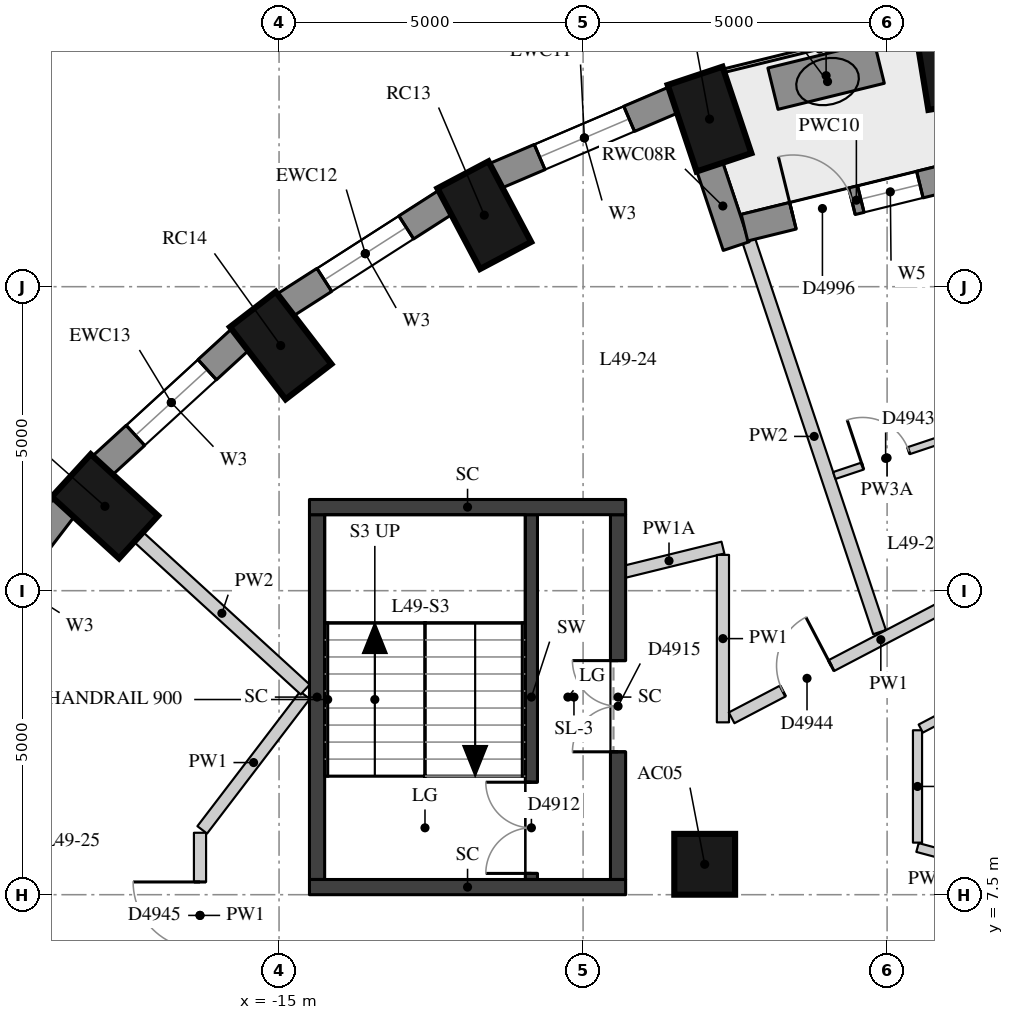
"""IFC4 building model, lengths in metres.
Left out: names, types, materials, properties, quantities, classifications, styles, units other than length and angle.
Written with IfcOpenShell. Run it as: python <this file> out.ifc"""

import sys

from ifc_helpers import new_model, si_unit, direction, frame, frame_2d, origin, origin_2d, place, context, subcontext, project, spatial, rectangle, extrude, element, fill, save


model = new_model("IFC4")
c1 = context("Model", 3, precision=1e-05, world=origin(), true_north=direction((0.0, 1.0)))
c2 = subcontext(c1, "Body", "Model", "MODEL_VIEW")
j1 = project(units=[si_unit("LENGTHUNIT", "METRE"), si_unit("PLANEANGLEUNIT", "RADIAN")], contexts=[c1])
p1 = place(None, origin())
s1 = spatial("IfcSite", under=j1, at=p1, CompositionType="ELEMENT")
p2 = place(p1, origin())
s2 = spatial("IfcBuilding", under=s1, at=p2, CompositionType="ELEMENT")
p3 = place(p2, frame((0.0, 0.0, 174.8)))
s3 = spatial("IfcBuildingStorey", under=s2, at=p3, CompositionType="ELEMENT", Elevation=174.8)
for number, where, z_axis, x_axis in (
    (1, (-3.972, 21.224, 0.0), (0.0, 0.0, 1.0), (-0.16, 0.987, 0.0)),
    (2, (-7.92, 20.256, 0.0), (0.0, 0.0, 1.0), (-0.317, 0.949, 0.0)),
    (3, (-11.625, 18.676, 0.0), (0.0, 0.0, 1.0), (-0.468, 0.884, 0.0)),
    (4, (-14.973, 16.532, 0.0), (0.0, 0.0, 1.0), (-0.61, 0.792, 0.0)),
    (5, (-17.864, 13.888, 0.0), (0.0, 0.0, 1.0), (-0.738, 0.675, 0.0)),
):
    element("IfcColumn", number, at=place(p3, frame(where, z_axis=z_axis, x_axis=x_axis)), inside=s3, PredefinedType="COLUMN", context=c2, shape_type="SweptSolid", body=[
        extrude(rectangle(XDim=1.5, YDim=0.95, at=origin_2d()), origin(), (0.0, 0.0, 1.0), 3.3),
    ])
p4 = place(p3, frame((-8.0, 8.0, 0.0), z_axis=(0.0, 0.0, 1.0), x_axis=(1.0, 0.0, 0.0)))
e6 = element("IfcColumn", 6, at=p4, inside=s3, PredefinedType="COLUMN", context=c2, shape_type="SweptSolid", body=[
    extrude(rectangle(XDim=1.0, YDim=1.0, at=origin_2d()), origin(), (0.0, 0.0, 1.0), 3.3),
])
p5 = place(p3, frame((-8.506, 20.574, 0.0), z_axis=(0.0, 0.0, 1.0), x_axis=(-0.919798725687, -0.392390499663, 0.0)))
e7 = element("IfcWall", 7, at=p5, inside=s3, PredefinedType="SOLIDWALL", context=c2, shape_type="SweptSolid", body=[
    extrude(rectangle(XDim=3.2, YDim=0.45, at=frame_2d((1.6, 0.0))), origin(), (0.0, 0.0, 1.0), 3.02),
])
p6 = place(p5, frame((0.8, 0.0, 0.4)))
e8 = element("IfcOpeningElement", 8, at=p6, cuts=e7, PredefinedType="OPENING", context=c2, shape_type="SweptSolid", body=[
    extrude(rectangle(XDim=1.6, YDim=1.75, at=frame_2d((0.8, 0.875))), frame((0.0, 0.235, 0.0), z_axis=(0.0, -1.0, 0.0), x_axis=(1.0, 0.0, 0.0)), (0.0, 0.0, 1.0), 0.47),
])
p7 = place(p3, frame((-12.255, 18.893, 0.0), z_axis=(0.0, 0.0, 1.0), x_axis=(-0.842030726237, -0.539429565442, 0.0)))
e9 = element("IfcWall", 9, at=p7, inside=s3, PredefinedType="SOLIDWALL", context=c2, shape_type="SweptSolid", body=[
    extrude(rectangle(XDim=3.151, YDim=0.45, at=frame_2d((1.576, 0.0))), origin(), (0.0, 0.0, 1.0), 3.02),
])
p8 = place(p7, frame((0.776, 0.0, 0.4)))
e10 = element("IfcOpeningElement", 10, at=p8, cuts=e9, PredefinedType="OPENING", context=c2, shape_type="SweptSolid", body=[
    extrude(rectangle(XDim=1.6, YDim=1.75, at=frame_2d((0.8, 0.875))), frame((0.0, 0.235, 0.0), z_axis=(0.0, -1.0, 0.0), x_axis=(1.0, 0.0, 0.0)), (0.0, 0.0, 1.0), 0.47),
])
p9 = place(p3, frame((-15.63, 16.639, 0.0), z_axis=(0.0, 0.0, 1.0), x_axis=(-0.737808755941, -0.675009807082, 0.0)))
e11 = element("IfcWall", 11, at=p9, inside=s3, PredefinedType="SOLIDWALL", context=c2, shape_type="SweptSolid", body=[
    extrude(rectangle(XDim=3.094, YDim=0.45, at=frame_2d((1.547, 0.0))), origin(), (0.0, 0.0, 1.0), 3.02),
])
p10 = place(p9, frame((0.747, 0.0, 0.4)))
e12 = element("IfcOpeningElement", 12, at=p10, cuts=e11, PredefinedType="OPENING", context=c2, shape_type="SweptSolid", body=[
    extrude(rectangle(XDim=1.6, YDim=1.75, at=frame_2d((0.8, 0.875))), frame((0.0, 0.235, 0.0), z_axis=(0.0, -1.0, 0.0), x_axis=(1.0, 0.0, 0.0)), (0.0, 0.0, 1.0), 0.47),
])
p11 = place(p3, frame((-18.528, 13.879, 0.0), z_axis=(0.0, 0.0, 1.0), x_axis=(-0.607817056371, -0.794077090706, 0.0)))
e13 = element("IfcWall", 13, at=p11, inside=s3, PredefinedType="SOLIDWALL", context=c2, shape_type="SweptSolid", body=[
    extrude(rectangle(XDim=3.037, YDim=0.45, at=frame_2d((1.519, 0.0))), origin(), (0.0, 0.0, 1.0), 3.02),
])
p12 = place(p11, frame((0.719, 0.0, 0.4)))
e14 = element("IfcOpeningElement", 14, at=p12, cuts=e13, PredefinedType="OPENING", context=c2, shape_type="SweptSolid", body=[
    extrude(rectangle(XDim=1.6, YDim=1.75, at=frame_2d((0.8, 0.875))), frame((0.0, 0.235, 0.0), z_axis=(0.0, -1.0, 0.0), x_axis=(1.0, 0.0, 0.0)), (0.0, 0.0, 1.0), 0.47),
])
p13 = place(p3, frame((-7.922, 19.486, 0.0), z_axis=(0.0, 0.0, 1.0), x_axis=(0.316649231286, -0.948542705589, 0.0)))
e15 = element("IfcWall", 15, at=p13, inside=s3, PredefinedType="SOLIDWALL", context=c2, shape_type="SweptSolid", body=[
    extrude(rectangle(XDim=1.39, YDim=0.45, at=frame_2d((0.695, 0.0))), origin(), (0.0, 0.0, 1.0), 3.02),
])
p14 = place(p3, frame((-3.665, 19.375, 0.0), z_axis=(0.0, 0.0, 1.0), x_axis=(-0.97110866251, -0.238637728782, 0.0)))
e16 = element("IfcWall", 16, at=p14, inside=s3, PredefinedType="SOLIDWALL", context=c2, shape_type="SweptSolid", body=[
    extrude(rectangle(XDim=3.789, YDim=0.45, at=frame_2d((1.895, 0.0))), origin(), (0.0, 0.0, 1.0), 3.02),
])
p15 = place(p14, frame((0.82, 0.0, 0.4)))
e17 = element("IfcOpeningElement", 17, at=p15, cuts=e16, PredefinedType="OPENING", context=c2, shape_type="SweptSolid", body=[
    extrude(rectangle(XDim=1.0, YDim=1.75, at=frame_2d((0.5, 0.875))), frame((0.0, 0.235, 0.0), z_axis=(0.0, -1.0, 0.0), x_axis=(1.0, 0.0, 0.0)), (0.0, 0.0, 1.0), 0.47),
])
p16 = place(p14, frame((1.97, 0.0, 0.0)))
e18 = element("IfcOpeningElement", 18, at=p16, cuts=e16, PredefinedType="OPENING", context=c2, shape_type="SweptSolid", body=[
    extrude(rectangle(XDim=1.0, YDim=2.15, at=frame_2d((0.5, 1.075))), frame((0.0, 0.235, 0.0), z_axis=(0.0, -1.0, 0.0), x_axis=(1.0, 0.0, 0.0)), (0.0, 0.0, 1.0), 0.47),
])
p17 = place(p3, frame((-5.129, 21.185, 0.0), z_axis=(0.0, 0.0, 1.0), x_axis=(-0.971257007956, -0.238033242419, 0.0)))
e19 = element("IfcWall", 19, at=p17, inside=s3, PredefinedType="USERDEFINED", context=c2, shape_type="SweptSolid", body=[
    extrude(rectangle(XDim=1.8, YDim=0.7, at=frame_2d((0.9, 0.0))), origin(), (0.0, 0.0, 1.0), 0.75),
])
p18 = place(p3, frame((-10.85, 7.75, 0.0), z_axis=(0.0, 0.0, 1.0), x_axis=(0.0, 1.0, 0.0)))
e20 = element("IfcWall", 20, at=p18, inside=s3, PredefinedType="SHEAR", context=c2, shape_type="SweptSolid", body=[
    extrude(rectangle(XDim=6.0, YDim=0.2, at=frame_2d((3.0, 0.0))), origin(), (0.0, 0.0, 1.0), 3.02),
])
p19 = place(p18, frame((0.1, 0.0, 0.0)))
e21 = element("IfcOpeningElement", 21, at=p19, cuts=e20, PredefinedType="OPENING", context=c2, shape_type="SweptSolid", body=[
    extrude(rectangle(XDim=1.5, YDim=2.1, at=frame_2d((0.75, 1.05))), frame((0.0, 0.11, 0.0), z_axis=(0.0, -1.0, 0.0), x_axis=(1.0, 0.0, 0.0)), (0.0, 0.0, 1.0), 0.22),
])
p20 = place(p3, frame((-14.375, 7.75, -0.28), z_axis=(0.0, 0.0, 1.0), x_axis=(0.0, 1.0, 0.0)))
e22 = element("IfcWall", 22, at=p20, inside=s3, PredefinedType="SHEAR", context=c2, shape_type="SweptSolid", body=[
    extrude(rectangle(XDim=6.0, YDim=0.25, at=frame_2d((3.0, 0.0))), origin(), (0.0, 0.0, 1.0), 3.3),
])
p21 = place(p3, frame((-9.425, 7.75, -0.28), z_axis=(0.0, 0.0, 1.0), x_axis=(0.0, 1.0, 0.0)))
e23 = element("IfcWall", 23, at=p21, inside=s3, PredefinedType="SHEAR", context=c2, shape_type="SweptSolid", body=[
    extrude(rectangle(XDim=6.0, YDim=0.25, at=frame_2d((3.0, 0.0))), origin(), (0.0, 0.0, 1.0), 3.3),
])
p22 = place(p21, frame((2.1, 0.0, 0.28)))
e24 = element("IfcOpeningElement", 24, at=p22, cuts=e23, PredefinedType="OPENING", context=c2, shape_type="SweptSolid", body=[
    extrude(rectangle(XDim=1.5, YDim=2.1, at=frame_2d((0.75, 1.05))), frame((0.0, 0.135, 0.0), z_axis=(0.0, -1.0, 0.0), x_axis=(1.0, 0.0, 0.0)), (0.0, 0.0, 1.0), 0.27),
])
for number, where, z_axis, x_axis in (
    (25, (-14.5, 13.875, -0.28), (0.0, 0.0, 1.0), (1.0, 0.0, 0.0)),
    (26, (-14.5, 7.625, -0.28), (0.0, 0.0, 1.0), (1.0, 0.0, 0.0)),
):
    element("IfcWall", number, at=place(p3, frame(where, z_axis=z_axis, x_axis=x_axis)), inside=s3, PredefinedType="SHEAR", context=c2, shape_type="SweptSolid", body=[
        extrude(rectangle(XDim=5.2, YDim=0.25, at=frame_2d((2.6, 0.0))), origin(), (0.0, 0.0, 1.0), 3.3),
    ])
p23 = place(p3, frame((-16.3, 5.8, 0.0), z_axis=(0.0, 0.0, 1.0), x_axis=(0.0, 1.0, 0.0)))
e27 = element("IfcWall", 27, at=p23, inside=s3, PredefinedType="PARTITIONING", context=c2, shape_type="SweptSolid", body=[
    extrude(rectangle(XDim=2.719, YDim=0.2, at=frame_2d((1.359, 0.0))), origin(), (0.0, 0.0, 1.0), 3.02),
])
p24 = place(p23, frame((0.809, 0.0, 0.0)))
e28 = element("IfcOpeningElement", 28, at=p24, cuts=e27, PredefinedType="OPENING", context=c2, shape_type="SweptSolid", body=[
    extrude(rectangle(XDim=1.1, YDim=2.1, at=frame_2d((0.55, 1.05))), frame((0.0, 0.11, 0.0), z_axis=(0.0, -1.0, 0.0), x_axis=(1.0, 0.0, 0.0)), (0.0, 0.0, 1.0), 0.22),
])
p25 = place(p3, frame((-16.263, 8.566, 0.0), z_axis=(0.0, 0.0, 1.0), x_axis=(0.606668946119, 0.794954583492, 0.0)))
e29 = element("IfcWall", 29, at=p25, inside=s3, PredefinedType="PARTITIONING", context=c2, shape_type="SweptSolid", body=[
    extrude(rectangle(XDim=2.785, YDim=0.2, at=frame_2d((1.393, 0.0))), origin(), (0.0, 0.0, 1.0), 3.02),
])
p26 = place(p3, frame((-9.474, 12.773, 0.0), z_axis=(0.0, 0.0, 1.0), x_axis=(0.971086426401, 0.238728197874, 0.0)))
e30 = element("IfcWall", 30, at=p26, inside=s3, PredefinedType="PARTITIONING", context=c2, shape_type="SweptSolid", body=[
    extrude(rectangle(XDim=1.826, YDim=0.2, at=frame_2d((0.913, 0.0))), origin(), (0.0, 0.0, 1.0), 2.57),
])
p27 = place(p3, frame((-7.7, 13.089, 0.0), z_axis=(0.0, 0.0, 1.0), x_axis=(0.0, -1.0, 0.0)))
e31 = element("IfcWall", 31, at=p27, inside=s3, PredefinedType="PARTITIONING", context=c2, shape_type="SweptSolid", body=[
    extrude(rectangle(XDim=2.754, YDim=0.2, at=frame_2d((1.377, 0.0))), origin(), (0.0, 0.0, 1.0), 3.02),
])
p28 = place(p3, frame((-7.557, 10.409, 0.0), z_axis=(0.0, 0.0, 1.0), x_axis=(0.885861719566, 0.463949365565, 0.0)))
e32 = element("IfcWall", 32, at=p28, inside=s3, PredefinedType="PARTITIONING", context=c2, shape_type="SweptSolid", body=[
    extrude(rectangle(XDim=5.541, YDim=0.2, at=frame_2d((2.77, 0.0))), origin(), (0.0, 0.0, 1.0), 3.02),
])
p29 = place(p28, frame((0.95, 0.0, 0.0)))
e33 = element("IfcOpeningElement", 33, at=p29, cuts=e32, PredefinedType="OPENING", context=c2, shape_type="SweptSolid", body=[
    extrude(rectangle(XDim=0.9, YDim=2.1, at=frame_2d((0.45, 1.05))), frame((0.0, 0.11, 0.0), z_axis=(0.0, -1.0, 0.0), x_axis=(1.0, 0.0, 0.0)), (0.0, 0.0, 1.0), 0.22),
])
p30 = place(p3, frame((-3.432, 7.99, 0.0), z_axis=(0.0, 0.0, 1.0), x_axis=(-0.965900750832, 0.258912609855, 0.0)))
e34 = element("IfcWall", 34, at=p30, inside=s3, PredefinedType="PARTITIONING", context=c2, shape_type="SweptSolid", body=[
    extrude(rectangle(XDim=1.106, YDim=0.15, at=frame_2d((0.553, 0.0))), origin(), (0.0, 0.0, 1.0), 3.02),
])
p31 = place(p3, frame((-4.5, 8.356, 0.0), z_axis=(0.0, 0.0, 1.0), x_axis=(0.0, 1.0, 0.0)))
e35 = element("IfcWall", 35, at=p31, inside=s3, PredefinedType="PARTITIONING", context=c2, shape_type="SweptSolid", body=[
    extrude(rectangle(XDim=1.848, YDim=0.15, at=frame_2d((0.924, 0.0))), origin(), (0.0, 0.0, 1.0), 3.02),
])
p32 = place(p3, frame((-4.447, 10.232, 0.0), z_axis=(0.0, 0.0, 1.0), x_axis=(0.885843659857, 0.463983847016, 0.0)))
e36 = element("IfcWall", 36, at=p32, inside=s3, PredefinedType="PARTITIONING", context=c2, shape_type="SweptSolid", body=[
    extrude(rectangle(XDim=2.365, YDim=0.15, at=frame_2d((1.182, 0.0))), origin(), (0.0, 0.0, 1.0), 3.02),
])
p33 = place(p3, frame((-7.274, 18.256, 0.0), z_axis=(0.0, 0.0, 1.0), x_axis=(0.316724121691, -0.948517701859, 0.0)))
e37 = element("IfcWall", 37, at=p33, inside=s3, PredefinedType="PARTITIONING", context=c2, shape_type="SweptSolid", body=[
    extrude(rectangle(XDim=6.787, YDim=0.22, at=frame_2d((3.394, 0.0))), origin(), (0.0, 0.0, 1.0), 3.02),
])
p34 = place(p3, frame((-17.31, 13.382, 0.0), z_axis=(0.0, 0.0, 1.0), x_axis=(0.737827699829, -0.674989100182, 0.0)))
e38 = element("IfcWall", 38, at=p34, inside=s3, PredefinedType="PARTITIONING", context=c2, shape_type="SweptSolid", body=[
    extrude(rectangle(XDim=3.714, YDim=0.22, at=frame_2d((1.857, 0.0))), origin(), (0.0, 0.0, 1.0), 3.02),
])
p35 = place(p3, frame((-21.239, 7.16, 0.0), z_axis=(0.0, 0.0, 1.0), x_axis=(0.929511234156, -0.368793798182, 0.0)))
e39 = element("IfcWall", 39, at=p35, inside=s3, PredefinedType="PARTITIONING", context=c2, shape_type="SweptSolid", body=[
    extrude(rectangle(XDim=7.444, YDim=0.22, at=frame_2d((3.722, 0.0))), origin(), (0.0, 0.0, 1.0), 3.02),
])
p36 = place(p3, frame((-4.133, 14.974, 0.0), z_axis=(0.0, 0.0, 1.0), x_axis=(-0.9485230882, -0.31670799035, 0.0)))
e40 = element("IfcWall", 40, at=p36, inside=s3, PredefinedType="PARTITIONING", context=c2, shape_type="SweptSolid", body=[
    extrude(rectangle(XDim=1.83, YDim=0.12, at=frame_2d((0.915, 0.0))), origin(), (0.0, 0.0, 1.0), 2.57),
])
p37 = place(p36, frame((0.54, 0.0, 0.0)))
e41 = element("IfcOpeningElement", 41, at=p37, cuts=e40, PredefinedType="OPENING", context=c2, shape_type="SweptSolid", body=[
    extrude(rectangle(XDim=0.8, YDim=2.1, at=frame_2d((0.4, 1.05))), frame((0.0, 0.07, 0.0), z_axis=(0.0, -1.0, 0.0), x_axis=(1.0, 0.0, 0.0)), (0.0, 0.0, 1.0), 0.14),
])
p38 = place(p6, origin())
e42 = element("IfcWindow", 42, at=p38, inside=s3, PartitioningType="SINGLE_PANEL", PredefinedType="WINDOW", context=c2, shape_type="SweptSolid", body=[
    extrude(rectangle(XDim=1.6, YDim=1.75, at=frame_2d((0.8, 0.875))), frame((0.0, 0.035, 0.0), z_axis=(0.0, -1.0, 0.0), x_axis=(1.0, 0.0, 0.0)), (0.0, 0.0, 1.0), 0.06),
])
fill(e8, e42)
p39 = place(p8, origin())
e43 = element("IfcWindow", 43, at=p39, inside=s3, PartitioningType="SINGLE_PANEL", PredefinedType="WINDOW", context=c2, shape_type="SweptSolid", body=[
    extrude(rectangle(XDim=1.6, YDim=1.75, at=frame_2d((0.8, 0.875))), frame((0.0, 0.035, 0.0), z_axis=(0.0, -1.0, 0.0), x_axis=(1.0, 0.0, 0.0)), (0.0, 0.0, 1.0), 0.06),
])
fill(e10, e43)
p40 = place(p10, origin())
e44 = element("IfcWindow", 44, at=p40, inside=s3, PartitioningType="SINGLE_PANEL", PredefinedType="WINDOW", context=c2, shape_type="SweptSolid", body=[
    extrude(rectangle(XDim=1.6, YDim=1.75, at=frame_2d((0.8, 0.875))), frame((0.0, 0.035, 0.0), z_axis=(0.0, -1.0, 0.0), x_axis=(1.0, 0.0, 0.0)), (0.0, 0.0, 1.0), 0.06),
])
fill(e12, e44)
p41 = place(p15, origin())
e45 = element("IfcWindow", 45, at=p41, inside=s3, PartitioningType="SINGLE_PANEL", PredefinedType="WINDOW", context=c2, shape_type="SweptSolid", body=[
    extrude(rectangle(XDim=1.0, YDim=1.75, at=frame_2d((0.5, 0.875))), frame((0.0, 0.035, 0.0), z_axis=(0.0, -1.0, 0.0), x_axis=(1.0, 0.0, 0.0)), (0.0, 0.0, 1.0), 0.06),
])
fill(e17, e45)
p42 = place(p16, frame((1.0, 0.0, 0.0), z_axis=(0.0, 0.0, 1.0), x_axis=(-1.0, 0.0, 0.0)))
e46 = element("IfcDoor", 46, at=p42, inside=s3, OperationType="SINGLE_SWING_LEFT", PredefinedType="DOOR", context=c2, shape_type="SweptSolid", body=[
    extrude(rectangle(XDim=1.0, YDim=2.15, at=frame_2d((0.5, 1.075))), frame((0.0, 0.075, 0.0), z_axis=(0.0, -1.0, 0.0), x_axis=(1.0, 0.0, 0.0)), (0.0, 0.0, 1.0), 0.05),
])
fill(e18, e46)
p43 = place(p19, origin())
e47 = element("IfcDoor", 47, at=p43, inside=s3, OperationType="DOUBLE_DOOR_SINGLE_SWING", PredefinedType="DOOR", context=c2, shape_type="SweptSolid", body=[
    extrude(rectangle(XDim=1.5, YDim=2.1, at=frame_2d((0.75, 1.05))), frame((0.0, 0.025, 0.0), z_axis=(0.0, -1.0, 0.0), x_axis=(1.0, 0.0, 0.0)), (0.0, 0.0, 1.0), 0.05),
])
fill(e21, e47)
p44 = place(p22, origin())
e48 = element("IfcDoor", 48, at=p44, inside=s3, OperationType="DOUBLE_DOOR_SINGLE_SWING", PredefinedType="DOOR", context=c2, shape_type="SweptSolid", body=[
    extrude(rectangle(XDim=1.5, YDim=2.1, at=frame_2d((0.75, 1.05))), frame((0.0, 0.025, 0.0), z_axis=(0.0, -1.0, 0.0), x_axis=(1.0, 0.0, 0.0)), (0.0, 0.0, 1.0), 0.05),
])
fill(e24, e48)
p45 = place(p37, origin())
e49 = element("IfcDoor", 49, at=p45, inside=s3, OperationType="SINGLE_SWING_LEFT", PredefinedType="DOOR", context=c2, shape_type="SweptSolid", body=[
    extrude(rectangle(XDim=0.8, YDim=2.1, at=frame_2d((0.4, 1.05))), frame((0.0, 0.025, 0.0), z_axis=(0.0, -1.0, 0.0), x_axis=(1.0, 0.0, 0.0)), (0.0, 0.0, 1.0), 0.05),
])
fill(e41, e49)
p46 = place(p29, origin())
e50 = element("IfcDoor", 50, at=p46, inside=s3, OperationType="SINGLE_SWING_RIGHT", PredefinedType="DOOR", context=c2, shape_type="SweptSolid", body=[
    extrude(rectangle(XDim=0.9, YDim=2.1, at=frame_2d((0.45, 1.05))), frame((0.0, 0.025, 0.0), z_axis=(0.0, -1.0, 0.0), x_axis=(1.0, 0.0, 0.0)), (0.0, 0.0, 1.0), 0.05),
])
fill(e33, e50)
p47 = place(p24, origin())
e51 = element("IfcDoor", 51, at=p47, inside=s3, OperationType="SINGLE_SWING_RIGHT", PredefinedType="DOOR", context=c2, shape_type="SweptSolid", body=[
    extrude(rectangle(XDim=1.1, YDim=2.1, at=frame_2d((0.55, 1.05))), frame((0.0, 0.025, 0.0), z_axis=(0.0, -1.0, 0.0), x_axis=(1.0, 0.0, 0.0)), (0.0, 0.0, 1.0), 0.05),
])
fill(e28, e51)
save(model, sys.argv[1])
